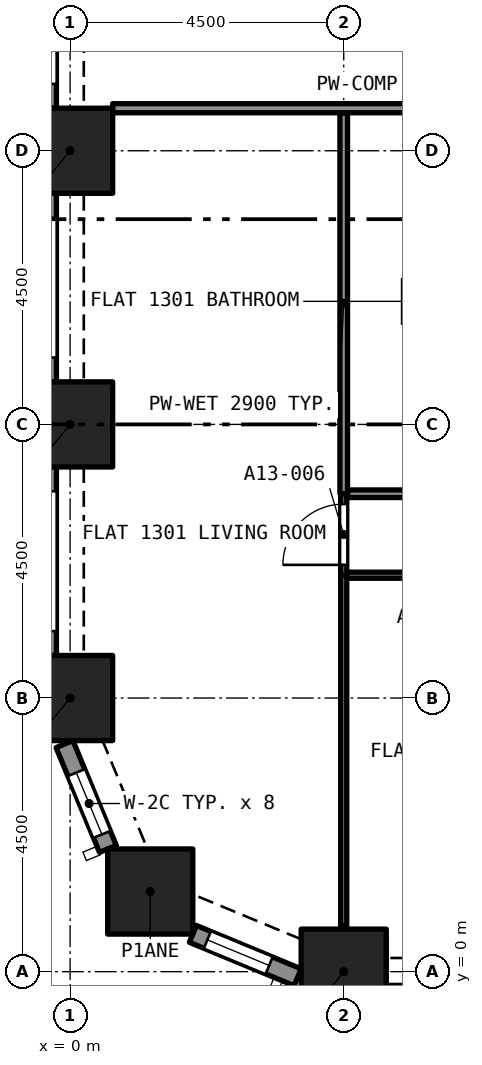
"""IFC4 building model, lengths in metres.
Left out: names, types, materials, properties, quantities, classifications, styles, units other than length and angle.
Written with IfcOpenShell. Run it as: python <this file> out.ifc"""

import sys

from ifc_helpers import new_model, si_unit, direction, frame, frame_2d, origin, origin_2d, place, context, subcontext, project, spatial, rectangle, extrude, element, fill, save


model = new_model("IFC4")
c1 = context("Model", 3, precision=1e-05, world=origin(), true_north=direction((0.0, 1.0)))
c2 = subcontext(c1, "Body", "Model", "MODEL_VIEW")
j1 = project(units=[si_unit("LENGTHUNIT", "METRE"), si_unit("PLANEANGLEUNIT", "RADIAN")], contexts=[c1])
p1 = place(None, origin())
s1 = spatial("IfcSite", under=j1, at=p1, CompositionType="ELEMENT")
p2 = place(p1, origin())
s2 = spatial("IfcBuilding", under=s1, at=p2, CompositionType="ELEMENT")
p3 = place(p2, frame((0.0, 0.0, 52.8)))
s3 = spatial("IfcBuildingStorey", under=s2, at=p3, CompositionType="ELEMENT", Elevation=52.8)
for number, where, z_axis, x_axis in (
    (1, (4.5, 0.0, 0.0), (0.0, 0.0, 1.0), (1.0, 0.0, 0.0)),
    (2, (1.318, 1.318, 0.0), (0.0, 0.0, 1.0), (1.0, 0.0, 0.0)),
    (3, (0.0, 4.5, 0.0), (0.0, 0.0, 1.0), (1.0, 0.0, 0.0)),
    (4, (0.0, 9.0, 0.0), (0.0, 0.0, 1.0), (1.0, 0.0, 0.0)),
    (5, (0.0, 13.5, 0.0), (0.0, 0.0, 1.0), (1.0, 0.0, 0.0)),
):
    element("IfcColumn", number, at=place(p3, frame(where, z_axis=z_axis, x_axis=x_axis)), inside=s3, PredefinedType="COLUMN", context=c2, shape_type="SweptSolid", body=[
        extrude(rectangle(XDim=1.4, YDim=1.4, at=origin_2d()), origin(), (0.0, 0.0, 1.0), 3.2),
    ])
p4 = place(p3, frame((0.622, 2.02, 0.0), z_axis=(0.0, 0.0, 1.0), x_axis=(-0.38262540684, 0.923903565336, 0.0)))
e6 = element("IfcWall", 6, at=p4, inside=s3, PredefinedType="SOLIDWALL", context=c2, shape_type="SweptSolid", body=[
    extrude(rectangle(XDim=1.865, YDim=0.3, at=frame_2d((0.933, 0.0))), origin(), (0.0, 0.0, 1.0), 3.2),
])
p5 = place(p4, frame((0.258, 0.0, 0.45)))
e7 = element("IfcOpeningElement", 7, at=p5, cuts=e6, PredefinedType="OPENING", context=c2, shape_type="SweptSolid", body=[
    extrude(rectangle(XDim=1.1, YDim=1.95, at=frame_2d((0.55, 0.975))), frame((0.0, 0.16, 0.0), z_axis=(0.0, -1.0, 0.0), x_axis=(1.0, 0.0, 0.0)), (0.0, 0.0, 1.0), 0.32),
])
p6 = place(p3, frame((3.743, -0.092, 0.0), z_axis=(0.0, 0.0, 1.0), x_axis=(-0.923857286003, 0.382737135771, 0.0)))
e8 = element("IfcWall", 8, at=p6, inside=s3, PredefinedType="SOLIDWALL", context=c2, shape_type="SweptSolid", body=[
    extrude(rectangle(XDim=1.865, YDim=0.3, at=frame_2d((0.933, 0.0))), origin(), (0.0, 0.0, 1.0), 3.2),
])
p7 = place(p6, frame((0.508, 0.0, 0.45)))
e9 = element("IfcOpeningElement", 9, at=p7, cuts=e8, PredefinedType="OPENING", context=c2, shape_type="SweptSolid", body=[
    extrude(rectangle(XDim=1.1, YDim=1.95, at=frame_2d((0.55, 0.975))), frame((0.0, 0.16, 0.0), z_axis=(0.0, -1.0, 0.0), x_axis=(1.0, 0.0, 0.0)), (0.0, 0.0, 1.0), 0.32),
])
p8 = place(p3, frame((-0.375, 14.2, 0.0), z_axis=(0.0, 0.0, 1.0), x_axis=(0.0, 1.0, 0.0)))
e10 = element("IfcWall", 10, at=p8, inside=s3, PredefinedType="SOLIDWALL", context=c2, shape_type="SweptSolid", body=[
    extrude(rectangle(XDim=3.1, YDim=0.3, at=frame_2d((1.55, 0.0))), origin(), (0.0, 0.0, 1.0), 3.2),
])
p9 = place(p8, frame((0.4, 0.0, 0.45)))
e11 = element("IfcOpeningElement", 11, at=p9, cuts=e10, PredefinedType="OPENING", context=c2, shape_type="SweptSolid", body=[
    extrude(rectangle(XDim=2.3, YDim=1.95, at=frame_2d((1.15, 0.975))), frame((0.0, 0.16, 0.0), z_axis=(0.0, -1.0, 0.0), x_axis=(1.0, 0.0, 0.0)), (0.0, 0.0, 1.0), 0.32),
])
p10 = place(p3, frame((-0.375, 9.7, 0.0), z_axis=(0.0, 0.0, 1.0), x_axis=(0.0, 1.0, 0.0)))
e12 = element("IfcWall", 12, at=p10, inside=s3, PredefinedType="SOLIDWALL", context=c2, shape_type="SweptSolid", body=[
    extrude(rectangle(XDim=3.1, YDim=0.3, at=frame_2d((1.55, 0.0))), origin(), (0.0, 0.0, 1.0), 3.2),
])
p11 = place(p10, frame((0.4, 0.0, 0.45)))
e13 = element("IfcOpeningElement", 13, at=p11, cuts=e12, PredefinedType="OPENING", context=c2, shape_type="SweptSolid", body=[
    extrude(rectangle(XDim=2.3, YDim=1.95, at=frame_2d((1.15, 0.975))), frame((0.0, 0.16, 0.0), z_axis=(0.0, -1.0, 0.0), x_axis=(1.0, 0.0, 0.0)), (0.0, 0.0, 1.0), 0.32),
])
p12 = place(p3, frame((-0.375, 5.2, 0.0), z_axis=(0.0, 0.0, 1.0), x_axis=(0.0, 1.0, 0.0)))
e14 = element("IfcWall", 14, at=p12, inside=s3, PredefinedType="SOLIDWALL", context=c2, shape_type="SweptSolid", body=[
    extrude(rectangle(XDim=3.1, YDim=0.3, at=frame_2d((1.55, 0.0))), origin(), (0.0, 0.0, 1.0), 3.2),
])
p13 = place(p12, frame((0.4, 0.0, 0.45)))
e15 = element("IfcOpeningElement", 15, at=p13, cuts=e14, PredefinedType="OPENING", context=c2, shape_type="SweptSolid", body=[
    extrude(rectangle(XDim=2.3, YDim=1.95, at=frame_2d((1.15, 0.975))), frame((0.0, 0.16, 0.0), z_axis=(0.0, -1.0, 0.0), x_axis=(1.0, 0.0, 0.0)), (0.0, 0.0, 1.0), 0.32),
])
p14 = place(p3, frame((4.562, 7.86, 0.0), z_axis=(0.0, 0.0, 1.0), x_axis=(1.0, 0.0, 0.0)))
e16 = element("IfcWall", 16, at=p14, inside=s3, PredefinedType="PARTITIONING", context=c2, shape_type="SweptSolid", body=[
    extrude(rectangle(XDim=3.536, YDim=0.125, at=frame_2d((1.768, 0.0))), origin(), (0.0, 0.0, 1.0), 2.9),
])
p15 = place(p14, frame((1.337, 0.0, 0.0)))
e17 = element("IfcOpeningElement", 17, at=p15, cuts=e16, PredefinedType="OPENING", context=c2, shape_type="SweptSolid", body=[
    extrude(rectangle(XDim=0.8, YDim=2.1, at=frame_2d((0.4, 1.05))), frame((0.0, 0.073, 0.0), z_axis=(0.0, -1.0, 0.0), x_axis=(1.0, 0.0, 0.0)), (0.0, 0.0, 1.0), 0.145),
])
p16 = place(p3, frame((4.5, 7.86, 0.0), z_axis=(0.0, 0.0, 1.0), x_axis=(0.0, 1.0, 0.0)))
e18 = element("IfcWall", 18, at=p16, inside=s3, PredefinedType="PARTITIONING", context=c2, shape_type="SweptSolid", body=[
    extrude(rectangle(XDim=6.265, YDim=0.125, at=frame_2d((3.132, 0.0))), origin(), (0.0, 0.0, 1.0), 2.9),
])
p17 = place(p3, frame((9.0, 6.52, 0.0), z_axis=(0.0, 0.0, 1.0), x_axis=(-1.0, 0.0, 0.0)))
e19 = element("IfcWall", 19, at=p17, inside=s3, PredefinedType="PARTITIONING", context=c2, shape_type="SweptSolid", body=[
    extrude(rectangle(XDim=4.45, YDim=0.1, at=frame_2d((2.225, 0.0))), origin(), (0.0, 0.0, 1.0), 2.9),
])
p18 = place(p17, frame((1.8, 0.0, 0.0)))
e20 = element("IfcOpeningElement", 20, at=p18, cuts=e19, PredefinedType="OPENING", context=c2, shape_type="SweptSolid", body=[
    extrude(rectangle(XDim=0.9, YDim=2.1, at=frame_2d((0.45, 1.05))), frame((0.0, 0.06, 0.0), z_axis=(0.0, -1.0, 0.0), x_axis=(1.0, 0.0, 0.0)), (0.0, 0.0, 1.0), 0.12),
])
p19 = place(p3, frame((4.5, 0.758, 0.0), z_axis=(0.0, 0.0, 1.0), x_axis=(0.0, 1.0, 0.0)))
e21 = element("IfcWall", 21, at=p19, inside=s3, PredefinedType="PARTITIONING", context=c2, shape_type="SweptSolid", body=[
    extrude(rectangle(XDim=5.762, YDim=0.1, at=frame_2d((2.881, 0.0))), origin(), (0.0, 0.0, 1.0), 2.9),
])
p20 = place(p3, frame((4.5, 6.52, 0.0), z_axis=(0.0, 0.0, 1.0), x_axis=(0.0, 1.0, 0.0)))
e22 = element("IfcWall", 22, at=p20, inside=s3, PredefinedType="PARTITIONING", context=c2, shape_type="SweptSolid", body=[
    extrude(rectangle(XDim=1.34, YDim=0.1, at=frame_2d((0.67, 0.0))), origin(), (0.0, 0.0, 1.0), 2.9),
])
p21 = place(p20, frame((0.17, 0.0, 0.0)))
e23 = element("IfcOpeningElement", 23, at=p21, cuts=e22, PredefinedType="OPENING", context=c2, shape_type="SweptSolid", body=[
    extrude(rectangle(XDim=1.0, YDim=2.1, at=frame_2d((0.5, 1.05))), frame((0.0, 0.06, 0.0), z_axis=(0.0, -1.0, 0.0), x_axis=(1.0, 0.0, 0.0)), (0.0, 0.0, 1.0), 0.12),
])
p22 = place(p3, frame((0.7, 14.2, 0.0), z_axis=(0.0, 0.0, 1.0), x_axis=(1.0, 0.0, 0.0)))
e24 = element("IfcWall", 24, at=p22, inside=s3, PredefinedType="PARTITIONING", context=c2, shape_type="SweptSolid", body=[
    extrude(rectangle(XDim=9.95, YDim=0.15, at=frame_2d((4.975, 0.0))), origin(), (0.0, 0.0, 1.0), 2.9),
])
p23 = place(p5, origin())
e25 = element("IfcWindow", 25, at=p23, inside=s3, PartitioningType="SINGLE_PANEL", PredefinedType="WINDOW", context=c2, shape_type="SweptSolid", body=[
    extrude(rectangle(XDim=1.1, YDim=1.95, at=frame_2d((0.55, 0.975))), frame((0.0, 0.03, 0.0), z_axis=(0.0, -1.0, 0.0), x_axis=(1.0, 0.0, 0.0)), (0.0, 0.0, 1.0), 0.06),
])
fill(e7, e25)
p24 = place(p7, origin())
e26 = element("IfcWindow", 26, at=p24, inside=s3, PartitioningType="SINGLE_PANEL", PredefinedType="WINDOW", context=c2, shape_type="SweptSolid", body=[
    extrude(rectangle(XDim=1.1, YDim=1.95, at=frame_2d((0.55, 0.975))), frame((0.0, 0.03, 0.0), z_axis=(0.0, -1.0, 0.0), x_axis=(1.0, 0.0, 0.0)), (0.0, 0.0, 1.0), 0.06),
])
fill(e9, e26)
p25 = place(p21, origin())
e27 = element("IfcDoor", 27, at=p25, inside=s3, OperationType="SINGLE_SWING_RIGHT", PredefinedType="DOOR", context=c2, shape_type="SweptSolid", body=[
    extrude(rectangle(XDim=1.0, YDim=2.1, at=frame_2d((0.5, 1.05))), frame((0.0, 0.025, 0.0), z_axis=(0.0, -1.0, 0.0), x_axis=(1.0, 0.0, 0.0)), (0.0, 0.0, 1.0), 0.05),
])
fill(e23, e27)
save(model, sys.argv[1])
